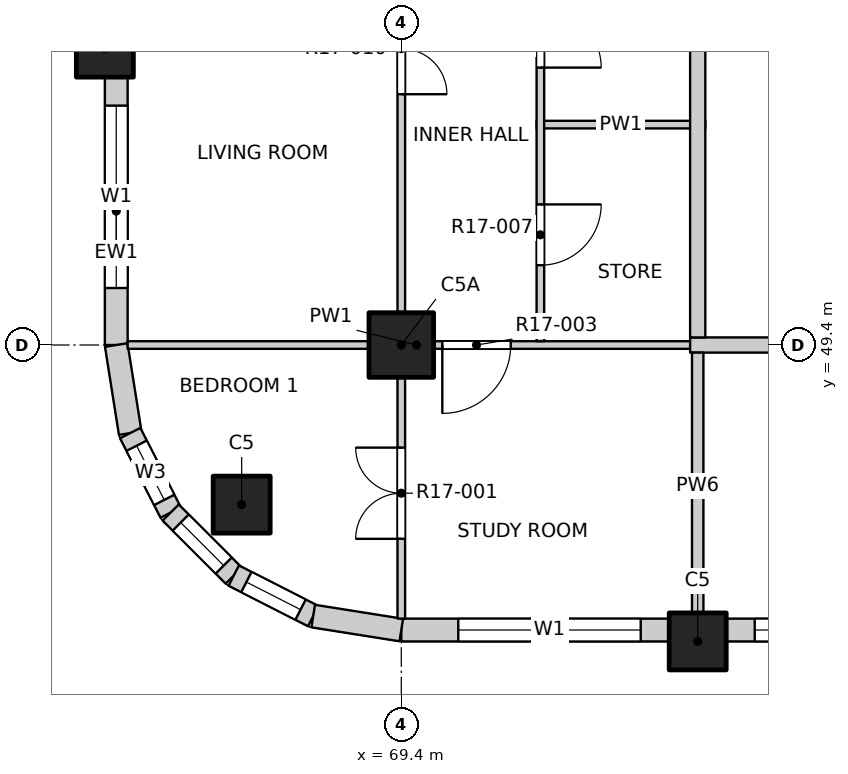
"""IFC4 building model, lengths in metres.
Left out: names, types, materials, properties, quantities, classifications, styles, units other than length and angle.
Written with IfcOpenShell. Run it as: python <this file> out.ifc"""

import sys

from ifc_helpers import new_model, si_unit, direction, frame, frame_2d, origin, origin_2d, place, context, subcontext, project, spatial, rectangle, extrude, element, fill, save


model = new_model("IFC4")
c1 = context("Model", 3, precision=1e-05, world=origin(), true_north=direction((0.0, 1.0)))
c2 = subcontext(c1, "Body", "Model", "MODEL_VIEW")
j1 = project(units=[si_unit("LENGTHUNIT", "METRE"), si_unit("PLANEANGLEUNIT", "RADIAN")], contexts=[c1])
p1 = place(None, origin())
s1 = spatial("IfcSite", under=j1, at=p1, CompositionType="ELEMENT")
p2 = place(p1, origin())
s2 = spatial("IfcBuilding", under=s1, at=p2, CompositionType="ELEMENT")
p3 = place(p2, frame((0.0, 0.0, 179.2)))
s3 = spatial("IfcBuildingStorey", under=s2, at=p3, CompositionType="ELEMENT", Elevation=179.2)
for number, where, z_axis, x_axis in (
    (1, (67.3, 47.3, -0.3), (0.0, 0.0, 1.0), (1.0, 0.0, 0.0)),
    (2, (65.5, 53.3, -0.3), (0.0, 0.0, 1.0), (1.0, 0.0, 0.0)),
    (3, (73.3, 45.5, -0.3), (0.0, 0.0, 1.0), (1.0, 0.0, 0.0)),
):
    element("IfcColumn", number, at=place(p3, frame(where, z_axis=z_axis, x_axis=x_axis)), inside=s3, PredefinedType="COLUMN", context=c2, shape_type="SweptSolid", body=[
        extrude(rectangle(XDim=0.75, YDim=0.75, at=origin_2d()), origin(), (0.0, 0.0, 1.0), 3.45),
    ])
p4 = place(p3, frame((69.4, 49.4, -0.3), z_axis=(0.0, 0.0, 1.0), x_axis=(1.0, 0.0, 0.0)))
e4 = element("IfcColumn", 4, at=p4, inside=s3, PredefinedType="COLUMN", context=c2, shape_type="SweptSolid", body=[
    extrude(rectangle(XDim=0.85, YDim=0.85, at=origin_2d()), origin(), (0.0, 0.0, 1.0), 3.45),
])
p5 = place(p3, frame((69.4, 45.65, 0.0), z_axis=(0.0, 0.0, 1.0), x_axis=(1.0, 0.0, 0.0)))
e5 = element("IfcWall", 5, at=p5, inside=s3, PredefinedType="SOLIDWALL", context=c2, shape_type="SweptSolid", body=[
    extrude(rectangle(XDim=3.525, YDim=0.3, at=frame_2d((1.763, 0.0))), origin(), (0.0, 0.0, 1.0), 2.7),
])
p6 = place(p5, frame((0.75, 0.0, 0.9)))
e6 = element("IfcOpeningElement", 6, at=p6, cuts=e5, PredefinedType="OPENING", context=c2, shape_type="SweptSolid", body=[
    extrude(rectangle(XDim=2.4, YDim=1.8, at=frame_2d((1.2, 0.9))), frame((0.0, 0.16, 0.0), z_axis=(0.0, -1.0, 0.0), x_axis=(1.0, 0.0, 0.0)), (0.0, 0.0, 1.0), 0.32),
])
p7 = place(p3, frame((73.675, 45.65, 0.0), z_axis=(0.0, 0.0, 1.0), x_axis=(1.0, 0.0, 0.0)))
e7 = element("IfcWall", 7, at=p7, inside=s3, PredefinedType="SOLIDWALL", context=c2, shape_type="SweptSolid", body=[
    extrude(rectangle(XDim=7.05, YDim=0.3, at=frame_2d((3.525, 0.0))), origin(), (0.0, 0.0, 1.0), 2.7),
])
p8 = place(p7, frame((0.375, 0.0, 0.9)))
e8 = element("IfcOpeningElement", 8, at=p8, cuts=e7, PredefinedType="OPENING", context=c2, shape_type="SweptSolid", body=[
    extrude(rectangle(XDim=2.4, YDim=1.8, at=frame_2d((1.2, 0.9))), frame((0.0, 0.16, 0.0), z_axis=(0.0, -1.0, 0.0), x_axis=(1.0, 0.0, 0.0)), (0.0, 0.0, 1.0), 0.32),
])
p9 = place(p7, frame((4.275, 0.0, 0.9)))
e9 = element("IfcOpeningElement", 9, at=p9, cuts=e7, PredefinedType="OPENING", context=c2, shape_type="SweptSolid", body=[
    extrude(rectangle(XDim=2.4, YDim=1.8, at=frame_2d((1.2, 0.9))), frame((0.0, 0.16, 0.0), z_axis=(0.0, -1.0, 0.0), x_axis=(1.0, 0.0, 0.0)), (0.0, 0.0, 1.0), 0.32),
])
p10 = place(p3, frame((65.65, 49.4, 0.0), z_axis=(0.0, 0.0, 1.0), x_axis=(0.0, 1.0, 0.0)))
e10 = element("IfcWall", 10, at=p10, inside=s3, PredefinedType="SOLIDWALL", context=c2, shape_type="SweptSolid", body=[
    extrude(rectangle(XDim=3.525, YDim=0.3, at=frame_2d((1.763, 0.0))), origin(), (0.0, 0.0, 1.0), 2.7),
])
p11 = place(p10, frame((0.75, 0.0, 0.9)))
e11 = element("IfcOpeningElement", 11, at=p11, cuts=e10, PredefinedType="OPENING", context=c2, shape_type="SweptSolid", body=[
    extrude(rectangle(XDim=2.4, YDim=1.8, at=frame_2d((1.2, 0.9))), frame((0.0, 0.16, 0.0), z_axis=(0.0, -1.0, 0.0), x_axis=(1.0, 0.0, 0.0)), (0.0, 0.0, 1.0), 0.32),
])
p12 = place(p3, frame((65.65, 49.4, 0.0), z_axis=(0.0, 0.0, 1.0), x_axis=(0.156496880861, -0.987678452879, 0.0)))
e12 = element("IfcWall", 12, at=p12, inside=s3, PredefinedType="SOLIDWALL", context=c2, shape_type="SweptSolid", body=[
    extrude(rectangle(XDim=1.173, YDim=0.3, at=frame_2d((0.586, 0.0))), origin(), (0.0, 0.0, 1.0), 2.7),
])
p13 = place(p3, frame((65.833, 48.241, 0.0), z_axis=(0.0, 0.0, 1.0), x_axis=(0.454025524128, -0.890988677504, 0.0)))
e13 = element("IfcWall", 13, at=p13, inside=s3, PredefinedType="SOLIDWALL", context=c2, shape_type="SweptSolid", body=[
    extrude(rectangle(XDim=1.173, YDim=0.3, at=frame_2d((0.587, 0.0))), origin(), (0.0, 0.0, 1.0), 2.7),
])
p14 = place(p13, frame((0.187, 0.0, 0.9)))
e14 = element("IfcOpeningElement", 14, at=p14, cuts=e13, PredefinedType="OPENING", context=c2, shape_type="SweptSolid", body=[
    extrude(rectangle(XDim=0.8, YDim=1.2, at=frame_2d((0.4, 0.6))), frame((0.0, 0.16, 0.0), z_axis=(0.0, -1.0, 0.0), x_axis=(1.0, 0.0, 0.0)), (0.0, 0.0, 1.0), 0.32),
])
p15 = place(p3, frame((66.366, 47.196, 0.0), z_axis=(0.0, 0.0, 1.0), x_axis=(0.707106781187, -0.707106781187, 0.0)))
e15 = element("IfcWall", 15, at=p15, inside=s3, PredefinedType="SOLIDWALL", context=c2, shape_type="SweptSolid", body=[
    extrude(rectangle(XDim=1.173, YDim=0.3, at=frame_2d((0.586, 0.0))), origin(), (0.0, 0.0, 1.0), 2.7),
])
p16 = place(p15, frame((0.187, 0.0, 0.9)))
e16 = element("IfcOpeningElement", 16, at=p16, cuts=e15, PredefinedType="OPENING", context=c2, shape_type="SweptSolid", body=[
    extrude(rectangle(XDim=0.8, YDim=1.2, at=frame_2d((0.4, 0.6))), frame((0.0, 0.16, 0.0), z_axis=(0.0, -1.0, 0.0), x_axis=(1.0, 0.0, 0.0)), (0.0, 0.0, 1.0), 0.32),
])
p17 = place(p3, frame((67.196, 46.366, 0.0), z_axis=(0.0, 0.0, 1.0), x_axis=(0.890988677504, -0.454025524128, 0.0)))
e17 = element("IfcWall", 17, at=p17, inside=s3, PredefinedType="SOLIDWALL", context=c2, shape_type="SweptSolid", body=[
    extrude(rectangle(XDim=1.173, YDim=0.3, at=frame_2d((0.587, 0.0))), origin(), (0.0, 0.0, 1.0), 2.7),
])
p18 = place(p17, frame((0.187, 0.0, 0.9)))
e18 = element("IfcOpeningElement", 18, at=p18, cuts=e17, PredefinedType="OPENING", context=c2, shape_type="SweptSolid", body=[
    extrude(rectangle(XDim=0.8, YDim=1.2, at=frame_2d((0.4, 0.6))), frame((0.0, 0.16, 0.0), z_axis=(0.0, -1.0, 0.0), x_axis=(1.0, 0.0, 0.0)), (0.0, 0.0, 1.0), 0.32),
])
p19 = place(p3, frame((68.241, 45.833, 0.0), z_axis=(0.0, 0.0, 1.0), x_axis=(0.987678452879, -0.156496880861, 0.0)))
e19 = element("IfcWall", 19, at=p19, inside=s3, PredefinedType="SOLIDWALL", context=c2, shape_type="SweptSolid", body=[
    extrude(rectangle(XDim=1.173, YDim=0.3, at=frame_2d((0.586, 0.0))), origin(), (0.0, 0.0, 1.0), 2.7),
])
p20 = place(p3, frame((65.8, 49.4, 0.0), z_axis=(0.0, 0.0, 1.0), x_axis=(1.0, 0.0, 0.0)))
e20 = element("IfcWall", 20, at=p20, inside=s3, PredefinedType="PARTITIONING", context=c2, shape_type="SweptSolid", body=[
    extrude(rectangle(XDim=7.6, YDim=0.1, at=frame_2d((3.8, 0.0))), origin(), (0.0, 0.0, 1.0), 3.15),
])
p21 = place(p20, frame((4.14, 0.0, 0.0)))
e21 = element("IfcOpeningElement", 21, at=p21, cuts=e20, PredefinedType="OPENING", context=c2, shape_type="SweptSolid", body=[
    extrude(rectangle(XDim=0.9, YDim=2.1, at=frame_2d((0.45, 1.05))), frame((0.0, 0.06, 0.0), z_axis=(0.0, -1.0, 0.0), x_axis=(1.0, 0.0, 0.0)), (0.0, 0.0, 1.0), 0.12),
])
p22 = place(p3, frame((73.2, 49.4, 0.0), z_axis=(0.0, 0.0, 1.0), x_axis=(1.0, 0.0, 0.0)))
e22 = element("IfcWall", 22, at=p22, inside=s3, PredefinedType="PARTITIONING", context=c2, shape_type="SweptSolid", body=[
    extrude(rectangle(XDim=23.6, YDim=0.2, at=frame_2d((11.8, 0.0))), origin(), (0.0, 0.0, 1.0), 3.15),
])
p23 = place(p22, frame((7.3, 0.0, 0.0)))
e23 = element("IfcOpeningElement", 23, at=p23, cuts=e22, PredefinedType="OPENING", context=c2, shape_type="SweptSolid", body=[
    extrude(rectangle(XDim=1.2, YDim=2.1, at=frame_2d((0.6, 1.05))), frame((0.0, 0.11, 0.0), z_axis=(0.0, -1.0, 0.0), x_axis=(1.0, 0.0, 0.0)), (0.0, 0.0, 1.0), 0.22),
])
p24 = place(p22, frame((20.125, 0.0, 0.0)))
e24 = element("IfcOpeningElement", 24, at=p24, cuts=e22, PredefinedType="OPENING", context=c2, shape_type="SweptSolid", body=[
    extrude(rectangle(XDim=1.2, YDim=2.1, at=frame_2d((0.6, 1.05))), frame((0.0, 0.11, 0.0), z_axis=(0.0, -1.0, 0.0), x_axis=(1.0, 0.0, 0.0)), (0.0, 0.0, 1.0), 0.22),
])
p25 = place(p3, frame((71.18, 52.3, 0.0), z_axis=(0.0, 0.0, 1.0), x_axis=(1.0, 0.0, 0.0)))
e25 = element("IfcWall", 25, at=p25, inside=s3, PredefinedType="PARTITIONING", context=c2, shape_type="SweptSolid", body=[
    extrude(rectangle(XDim=2.22, YDim=0.1, at=frame_2d((1.11, 0.0))), origin(), (0.0, 0.0, 1.0), 3.15),
])
p26 = place(p3, frame((69.4, 45.8, 0.0), z_axis=(0.0, 0.0, 1.0), x_axis=(0.0, 1.0, 0.0)))
e26 = element("IfcWall", 26, at=p26, inside=s3, PredefinedType="PARTITIONING", context=c2, shape_type="SweptSolid", body=[
    extrude(rectangle(XDim=38.4, YDim=0.1, at=frame_2d((19.2, 0.0))), origin(), (0.0, 0.0, 1.0), 3.15),
])
p27 = place(p26, frame((1.05, 0.0, 0.0)))
e27 = element("IfcOpeningElement", 27, at=p27, cuts=e26, PredefinedType="OPENING", context=c2, shape_type="SweptSolid", body=[
    extrude(rectangle(XDim=1.2, YDim=2.1, at=frame_2d((0.6, 1.05))), frame((0.0, 0.06, 0.0), z_axis=(0.0, -1.0, 0.0), x_axis=(1.0, 0.0, 0.0)), (0.0, 0.0, 1.0), 0.12),
])
p28 = place(p26, frame((6.9, 0.0, 0.0)))
e28 = element("IfcOpeningElement", 28, at=p28, cuts=e26, PredefinedType="OPENING", context=c2, shape_type="SweptSolid", body=[
    extrude(rectangle(XDim=1.2, YDim=2.1, at=frame_2d((0.6, 1.05))), frame((0.0, 0.06, 0.0), z_axis=(0.0, -1.0, 0.0), x_axis=(1.0, 0.0, 0.0)), (0.0, 0.0, 1.0), 0.12),
])
p29 = place(p26, frame((12.9, 0.0, 0.0)))
e29 = element("IfcOpeningElement", 29, at=p29, cuts=e26, PredefinedType="OPENING", context=c2, shape_type="SweptSolid", body=[
    extrude(rectangle(XDim=0.9, YDim=2.1, at=frame_2d((0.45, 1.05))), frame((0.0, 0.06, 0.0), z_axis=(0.0, -1.0, 0.0), x_axis=(1.0, 0.0, 0.0)), (0.0, 0.0, 1.0), 0.12),
])
p30 = place(p26, frame((16.8, 0.0, 0.0)))
e30 = element("IfcOpeningElement", 30, at=p30, cuts=e26, PredefinedType="OPENING", context=c2, shape_type="SweptSolid", body=[
    extrude(rectangle(XDim=0.9, YDim=2.1, at=frame_2d((0.45, 1.05))), frame((0.0, 0.06, 0.0), z_axis=(0.0, -1.0, 0.0), x_axis=(1.0, 0.0, 0.0)), (0.0, 0.0, 1.0), 0.12),
])
p31 = place(p26, frame((20.7, 0.0, 0.0)))
e31 = element("IfcOpeningElement", 31, at=p31, cuts=e26, PredefinedType="OPENING", context=c2, shape_type="SweptSolid", body=[
    extrude(rectangle(XDim=0.9, YDim=2.1, at=frame_2d((0.45, 1.05))), frame((0.0, 0.06, 0.0), z_axis=(0.0, -1.0, 0.0), x_axis=(1.0, 0.0, 0.0)), (0.0, 0.0, 1.0), 0.12),
])
p32 = place(p26, frame((24.6, 0.0, 0.0)))
e32 = element("IfcOpeningElement", 32, at=p32, cuts=e26, PredefinedType="OPENING", context=c2, shape_type="SweptSolid", body=[
    extrude(rectangle(XDim=0.9, YDim=2.1, at=frame_2d((0.45, 1.05))), frame((0.0, 0.06, 0.0), z_axis=(0.0, -1.0, 0.0), x_axis=(1.0, 0.0, 0.0)), (0.0, 0.0, 1.0), 0.12),
])
p33 = place(p26, frame((28.5, 0.0, 0.0)))
e33 = element("IfcOpeningElement", 33, at=p33, cuts=e26, PredefinedType="OPENING", context=c2, shape_type="SweptSolid", body=[
    extrude(rectangle(XDim=0.9, YDim=2.1, at=frame_2d((0.45, 1.05))), frame((0.0, 0.06, 0.0), z_axis=(0.0, -1.0, 0.0), x_axis=(1.0, 0.0, 0.0)), (0.0, 0.0, 1.0), 0.12),
])
p34 = place(p26, frame((32.4, 0.0, 0.0)))
e34 = element("IfcOpeningElement", 34, at=p34, cuts=e26, PredefinedType="OPENING", context=c2, shape_type="SweptSolid", body=[
    extrude(rectangle(XDim=0.9, YDim=2.1, at=frame_2d((0.45, 1.05))), frame((0.0, 0.06, 0.0), z_axis=(0.0, -1.0, 0.0), x_axis=(1.0, 0.0, 0.0)), (0.0, 0.0, 1.0), 0.12),
])
p35 = place(p26, frame((36.15, 0.0, 0.0)))
e35 = element("IfcOpeningElement", 35, at=p35, cuts=e26, PredefinedType="OPENING", context=c2, shape_type="SweptSolid", body=[
    extrude(rectangle(XDim=1.2, YDim=2.1, at=frame_2d((0.6, 1.05))), frame((0.0, 0.06, 0.0), z_axis=(0.0, -1.0, 0.0), x_axis=(1.0, 0.0, 0.0)), (0.0, 0.0, 1.0), 0.12),
])
p36 = place(p3, frame((71.23, 49.45, 0.0), z_axis=(0.0, 0.0, 1.0), x_axis=(0.0, 1.0, 0.0)))
e36 = element("IfcWall", 36, at=p36, inside=s3, PredefinedType="PARTITIONING", context=c2, shape_type="SweptSolid", body=[
    extrude(rectangle(XDim=9.3, YDim=0.1, at=frame_2d((4.65, 0.0))), origin(), (0.0, 0.0, 1.0), 3.15),
])
p37 = place(p36, frame((1.0, 0.0, 0.0)))
e37 = element("IfcOpeningElement", 37, at=p37, cuts=e36, PredefinedType="OPENING", context=c2, shape_type="SweptSolid", body=[
    extrude(rectangle(XDim=0.8, YDim=2.1, at=frame_2d((0.4, 1.05))), frame((0.0, 0.06, 0.0), z_axis=(0.0, -1.0, 0.0), x_axis=(1.0, 0.0, 0.0)), (0.0, 0.0, 1.0), 0.12),
])
p38 = place(p36, frame((3.6, 0.0, 0.0)))
e38 = element("IfcOpeningElement", 38, at=p38, cuts=e36, PredefinedType="OPENING", context=c2, shape_type="SweptSolid", body=[
    extrude(rectangle(XDim=0.8, YDim=2.1, at=frame_2d((0.4, 1.05))), frame((0.0, 0.06, 0.0), z_axis=(0.0, -1.0, 0.0), x_axis=(1.0, 0.0, 0.0)), (0.0, 0.0, 1.0), 0.12),
])
p39 = place(p36, frame((5.6, 0.0, 0.0)))
e39 = element("IfcOpeningElement", 39, at=p39, cuts=e36, PredefinedType="OPENING", context=c2, shape_type="SweptSolid", body=[
    extrude(rectangle(XDim=0.9, YDim=2.1, at=frame_2d((0.45, 1.05))), frame((0.0, 0.06, 0.0), z_axis=(0.0, -1.0, 0.0), x_axis=(1.0, 0.0, 0.0)), (0.0, 0.0, 1.0), 0.12),
])
p40 = place(p36, frame((7.7, 0.0, 0.0)))
e40 = element("IfcOpeningElement", 40, at=p40, cuts=e36, PredefinedType="OPENING", context=c2, shape_type="SweptSolid", body=[
    extrude(rectangle(XDim=0.9, YDim=2.1, at=frame_2d((0.45, 1.05))), frame((0.0, 0.06, 0.0), z_axis=(0.0, -1.0, 0.0), x_axis=(1.0, 0.0, 0.0)), (0.0, 0.0, 1.0), 0.12),
])
p41 = place(p3, frame((73.3, 45.8, 0.0), z_axis=(0.0, 0.0, 1.0), x_axis=(0.0, 1.0, 0.0)))
e41 = element("IfcWall", 41, at=p41, inside=s3, PredefinedType="PARTITIONING", context=c2, shape_type="SweptSolid", body=[
    extrude(rectangle(XDim=3.5, YDim=0.15, at=frame_2d((1.75, 0.0))), origin(), (0.0, 0.0, 1.0), 3.15),
])
p42 = place(p3, frame((73.3, 49.5, 0.0), z_axis=(0.0, 0.0, 1.0), x_axis=(0.0, 1.0, 0.0)))
e42 = element("IfcWall", 42, at=p42, inside=s3, PredefinedType="PARTITIONING", context=c2, shape_type="SweptSolid", body=[
    extrude(rectangle(XDim=34.7, YDim=0.2, at=frame_2d((17.35, 0.0))), origin(), (0.0, 0.0, 1.0), 3.15),
])
p43 = place(p42, frame((10.575, 0.0, 0.0)))
e43 = element("IfcOpeningElement", 43, at=p43, cuts=e42, PredefinedType="OPENING", context=c2, shape_type="SweptSolid", body=[
    extrude(rectangle(XDim=1.0, YDim=2.1, at=frame_2d((0.5, 1.05))), frame((0.0, 0.11, 0.0), z_axis=(0.0, -1.0, 0.0), x_axis=(1.0, 0.0, 0.0)), (0.0, 0.0, 1.0), 0.22),
])
p44 = place(p42, frame((18.825, 0.0, 0.0)))
e44 = element("IfcOpeningElement", 44, at=p44, cuts=e42, PredefinedType="OPENING", context=c2, shape_type="SweptSolid", body=[
    extrude(rectangle(XDim=1.0, YDim=2.1, at=frame_2d((0.5, 1.05))), frame((0.0, 0.11, 0.0), z_axis=(0.0, -1.0, 0.0), x_axis=(1.0, 0.0, 0.0)), (0.0, 0.0, 1.0), 0.22),
])
p45 = place(p42, frame((29.075, 0.0, 0.0)))
e45 = element("IfcOpeningElement", 45, at=p45, cuts=e42, PredefinedType="OPENING", context=c2, shape_type="SweptSolid", body=[
    extrude(rectangle(XDim=1.0, YDim=2.1, at=frame_2d((0.5, 1.05))), frame((0.0, 0.11, 0.0), z_axis=(0.0, -1.0, 0.0), x_axis=(1.0, 0.0, 0.0)), (0.0, 0.0, 1.0), 0.22),
])
p46 = place(p6, origin())
e46 = element("IfcWindow", 46, at=p46, inside=s3, PartitioningType="DOUBLE_PANEL_VERTICAL", PredefinedType="WINDOW", context=c2, shape_type="SweptSolid", body=[
    extrude(rectangle(XDim=2.4, YDim=1.8, at=frame_2d((1.2, 0.9))), frame((0.0, 0.03, 0.0), z_axis=(0.0, -1.0, 0.0), x_axis=(1.0, 0.0, 0.0)), (0.0, 0.0, 1.0), 0.06),
])
fill(e6, e46)
p47 = place(p8, origin())
e47 = element("IfcWindow", 47, at=p47, inside=s3, PartitioningType="DOUBLE_PANEL_VERTICAL", PredefinedType="WINDOW", context=c2, shape_type="SweptSolid", body=[
    extrude(rectangle(XDim=2.4, YDim=1.8, at=frame_2d((1.2, 0.9))), frame((0.0, 0.03, 0.0), z_axis=(0.0, -1.0, 0.0), x_axis=(1.0, 0.0, 0.0)), (0.0, 0.0, 1.0), 0.06),
])
fill(e8, e47)
p48 = place(p11, origin())
e48 = element("IfcWindow", 48, at=p48, inside=s3, PartitioningType="DOUBLE_PANEL_VERTICAL", PredefinedType="WINDOW", context=c2, shape_type="SweptSolid", body=[
    extrude(rectangle(XDim=2.4, YDim=1.8, at=frame_2d((1.2, 0.9))), frame((0.0, 0.03, 0.0), z_axis=(0.0, -1.0, 0.0), x_axis=(1.0, 0.0, 0.0)), (0.0, 0.0, 1.0), 0.06),
])
fill(e11, e48)
p49 = place(p14, origin())
e49 = element("IfcWindow", 49, at=p49, inside=s3, PartitioningType="SINGLE_PANEL", PredefinedType="WINDOW", context=c2, shape_type="SweptSolid", body=[
    extrude(rectangle(XDim=0.8, YDim=1.2, at=frame_2d((0.4, 0.6))), frame((0.0, 0.03, 0.0), z_axis=(0.0, -1.0, 0.0), x_axis=(1.0, 0.0, 0.0)), (0.0, 0.0, 1.0), 0.06),
])
fill(e14, e49)
p50 = place(p16, origin())
e50 = element("IfcWindow", 50, at=p50, inside=s3, PartitioningType="SINGLE_PANEL", PredefinedType="WINDOW", context=c2, shape_type="SweptSolid", body=[
    extrude(rectangle(XDim=0.8, YDim=1.2, at=frame_2d((0.4, 0.6))), frame((0.0, 0.03, 0.0), z_axis=(0.0, -1.0, 0.0), x_axis=(1.0, 0.0, 0.0)), (0.0, 0.0, 1.0), 0.06),
])
fill(e16, e50)
p51 = place(p18, origin())
e51 = element("IfcWindow", 51, at=p51, inside=s3, PartitioningType="SINGLE_PANEL", PredefinedType="WINDOW", context=c2, shape_type="SweptSolid", body=[
    extrude(rectangle(XDim=0.8, YDim=1.2, at=frame_2d((0.4, 0.6))), frame((0.0, 0.03, 0.0), z_axis=(0.0, -1.0, 0.0), x_axis=(1.0, 0.0, 0.0)), (0.0, 0.0, 1.0), 0.06),
])
fill(e18, e51)
p52 = place(p27, origin())
e52 = element("IfcDoor", 52, at=p52, inside=s3, OperationType="DOUBLE_DOOR_SINGLE_SWING", PredefinedType="DOOR", context=c2, shape_type="SweptSolid", body=[
    extrude(rectangle(XDim=1.2, YDim=2.1, at=frame_2d((0.6, 1.05))), frame((0.0, 0.025, 0.0), z_axis=(0.0, -1.0, 0.0), x_axis=(1.0, 0.0, 0.0)), (0.0, 0.0, 1.0), 0.05),
])
fill(e27, e52)
p53 = place(p21, origin())
e53 = element("IfcDoor", 53, at=p53, inside=s3, OperationType="SINGLE_SWING_RIGHT", PredefinedType="DOOR", context=c2, shape_type="SweptSolid", body=[
    extrude(rectangle(XDim=0.9, YDim=2.1, at=frame_2d((0.45, 1.05))), frame((0.0, 0.025, 0.0), z_axis=(0.0, -1.0, 0.0), x_axis=(1.0, 0.0, 0.0)), (0.0, 0.0, 1.0), 0.05),
])
fill(e21, e53)
p54 = place(p37, origin())
e54 = element("IfcDoor", 54, at=p54, inside=s3, OperationType="SINGLE_SWING_LEFT", PredefinedType="DOOR", context=c2, shape_type="SweptSolid", body=[
    extrude(rectangle(XDim=0.8, YDim=2.1, at=frame_2d((0.4, 1.05))), frame((0.0, 0.025, 0.0), z_axis=(0.0, -1.0, 0.0), x_axis=(1.0, 0.0, 0.0)), (0.0, 0.0, 1.0), 0.05),
])
fill(e37, e54)
p55 = place(p28, origin())
e55 = element("IfcDoor", 55, at=p55, inside=s3, OperationType="DOUBLE_DOOR_SINGLE_SWING", PredefinedType="DOOR", context=c2, shape_type="SweptSolid", body=[
    extrude(rectangle(XDim=1.2, YDim=2.1, at=frame_2d((0.6, 1.05))), frame((0.0, 0.025, 0.0), z_axis=(0.0, -1.0, 0.0), x_axis=(1.0, 0.0, 0.0)), (0.0, 0.0, 1.0), 0.05),
])
fill(e28, e55)
p56 = place(p38, origin())
e56 = element("IfcDoor", 56, at=p56, inside=s3, OperationType="SINGLE_SWING_RIGHT", PredefinedType="DOOR", context=c2, shape_type="SweptSolid", body=[
    extrude(rectangle(XDim=0.8, YDim=2.1, at=frame_2d((0.4, 1.05))), frame((0.0, 0.025, 0.0), z_axis=(0.0, -1.0, 0.0), x_axis=(1.0, 0.0, 0.0)), (0.0, 0.0, 1.0), 0.05),
])
fill(e38, e56)
save(model, sys.argv[1])
